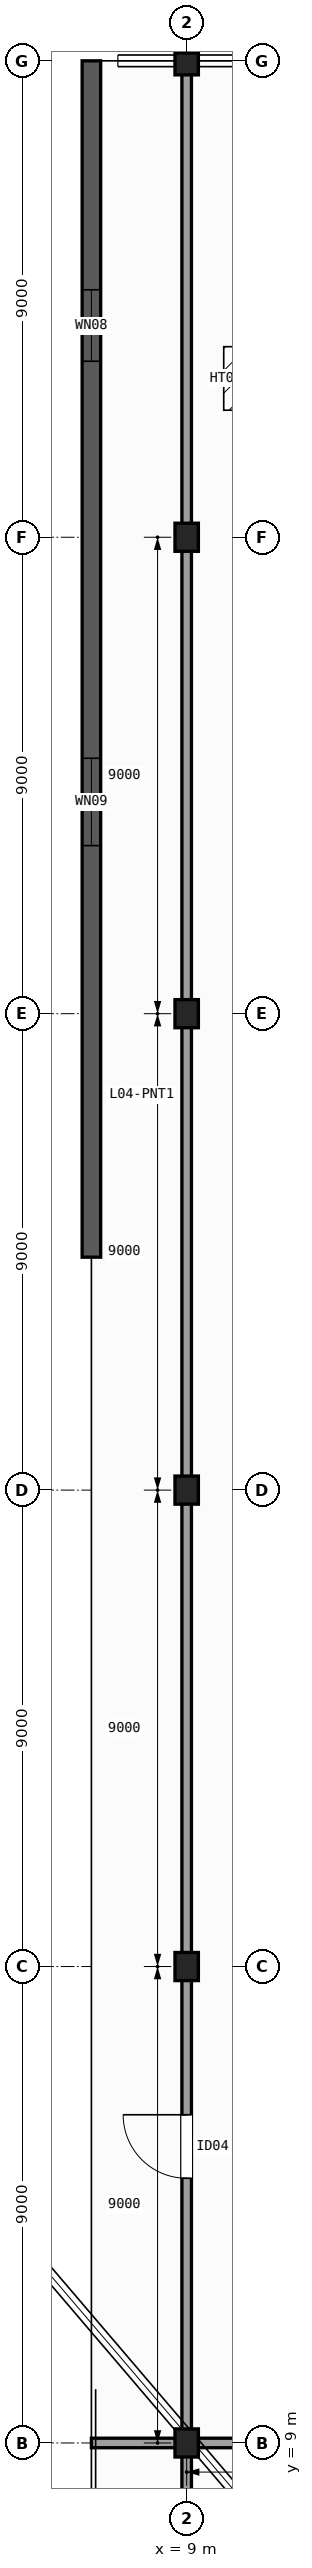
"""IFC4 building model, lengths in metres.
Left out: names, types, materials, properties, quantities, classifications, styles, units other than length and angle.
Written with IfcOpenShell. Run it as: python <this file> out.ifc"""

import sys

from ifc_helpers import new_model, si_unit, direction, frame, frame_2d, origin, origin_2d, place, context, subcontext, project, spatial, rectangle, i_section, extrude, element, fill, save


model = new_model("IFC4")
c1 = context("Model", 3, precision=1e-05, world=origin(), true_north=direction((0.0, 1.0)))
c2 = subcontext(c1, "Body", "Model", "MODEL_VIEW")
j1 = project(units=[si_unit("LENGTHUNIT", "METRE"), si_unit("PLANEANGLEUNIT", "RADIAN")], contexts=[c1])
p1 = place(None, origin())
s1 = spatial("IfcSite", under=j1, at=p1, CompositionType="ELEMENT")
p2 = place(p1, origin())
s2 = spatial("IfcBuilding", under=s1, at=p2, CompositionType="ELEMENT")
p3 = place(p2, frame((0.0, 0.0, 21.2)))
s3 = spatial("IfcBuildingStorey", under=s2, at=p3, CompositionType="ELEMENT", Elevation=21.2)
for number, where, z_axis, x_axis in (
    (1, (9.0, 9.0, 0.0), (0.0, 0.0, 1.0), (1.0, 0.0, 0.0)),
    (2, (9.0, 18.0, 0.0), (0.0, 0.0, 1.0), (1.0, 0.0, 0.0)),
    (3, (9.0, 27.0, 0.0), (0.0, 0.0, 1.0), (1.0, 0.0, 0.0)),
    (4, (9.0, 36.0, 0.0), (0.0, 0.0, 1.0), (1.0, 0.0, 0.0)),
    (5, (9.0, 45.0, 0.0), (0.0, 0.0, 1.0), (1.0, 0.0, 0.0)),
    (6, (9.0, 54.0, 0.0), (0.0, 0.0, 1.0), (1.0, 0.0, 0.0)),
):
    element("IfcColumn", number, at=place(p3, frame(where, z_axis=z_axis, x_axis=x_axis)), inside=s3, PredefinedType="COLUMN", context=c2, shape_type="SweptSolid", body=[
        extrude(i_section(OverallWidth=0.442, OverallDepth=0.531, WebThickness=0.066, FlangeThickness=0.106, FilletRadius=0.015, at=origin_2d()), origin(), (0.0, 0.0, 1.0), 4.8),
    ])
p4 = place(p3, frame((7.2, 31.4, 0.0), z_axis=(0.0, 0.0, 1.0), x_axis=(0.0, 1.0, 0.0)))
e7 = element("IfcWall", 7, at=p4, inside=s3, PredefinedType="SOLIDWALL", context=c2, shape_type="SweptSolid", body=[
    extrude(rectangle(XDim=22.6, YDim=0.35, at=frame_2d((11.3, 0.0))), origin(), (0.0, 0.0, 1.0), 4.48),
])
p5 = place(p4, frame((7.775, 0.0, 1.0)))
e8 = element("IfcOpeningElement", 8, at=p5, cuts=e7, PredefinedType="OPENING", context=c2, shape_type="SweptSolid", body=[
    extrude(rectangle(XDim=1.65, YDim=2.25, at=frame_2d((0.825, 1.125))), frame((0.0, 0.185, 0.0), z_axis=(0.0, -1.0, 0.0), x_axis=(1.0, 0.0, 0.0)), (0.0, 0.0, 1.0), 0.37),
])
p6 = place(p4, frame((16.925, 0.0, 1.0)))
e9 = element("IfcOpeningElement", 9, at=p6, cuts=e7, PredefinedType="OPENING", context=c2, shape_type="SweptSolid", body=[
    extrude(rectangle(XDim=1.35, YDim=2.1, at=frame_2d((0.675, 1.05))), frame((0.0, 0.185, 0.0), z_axis=(0.0, -1.0, 0.0), x_axis=(1.0, 0.0, 0.0)), (0.0, 0.0, 1.0), 0.37),
])
p7 = place(p3, frame((9.0, 7.2, 0.0), z_axis=(0.0, 0.0, 1.0), x_axis=(0.0, 1.0, 0.0)))
e10 = element("IfcWall", 10, at=p7, inside=s3, PredefinedType="PARTITIONING", context=c2, shape_type="SweptSolid", body=[
    extrude(rectangle(XDim=46.8, YDim=0.18, at=frame_2d((23.4, 0.0))), origin(), (0.0, 0.0, 1.0), 3.512),
])
p8 = place(p7, frame((6.8, 0.0, 0.0)))
e11 = element("IfcOpeningElement", 11, at=p8, cuts=e10, PredefinedType="OPENING", context=c2, shape_type="SweptSolid", body=[
    extrude(rectangle(XDim=1.2, YDim=2.15, at=frame_2d((0.6, 1.075))), frame((0.0, 0.1, 0.0), z_axis=(0.0, -1.0, 0.0), x_axis=(1.0, 0.0, 0.0)), (0.0, 0.0, 1.0), 0.2),
])
p9 = place(p3, frame((7.2, 9.0, 0.0), z_axis=(0.0, 0.0, 1.0), x_axis=(1.0, 0.0, 0.0)))
e12 = element("IfcWall", 12, at=p9, inside=s3, PredefinedType="PARTITIONING", context=c2, shape_type="SweptSolid", body=[
    extrude(rectangle(XDim=17.45, YDim=0.18, at=frame_2d((8.725, 0.0))), origin(), (0.0, 0.0, 1.0), 3.533),
])
p10 = place(p9, frame((6.3, 0.0, 0.0)))
e13 = element("IfcOpeningElement", 13, at=p10, cuts=e12, PredefinedType="OPENING", context=c2, shape_type="SweptSolid", body=[
    extrude(rectangle(XDim=0.86, YDim=2.05, at=frame_2d((0.43, 1.025))), frame((0.0, 0.1, 0.0), z_axis=(0.0, -1.0, 0.0), x_axis=(1.0, 0.0, 0.0)), (0.0, 0.0, 1.0), 0.2),
])
p11 = place(p5, origin())
e14 = element("IfcWindow", 14, at=p11, inside=s3, PartitioningType="SINGLE_PANEL", PredefinedType="WINDOW", context=c2, shape_type="SweptSolid", body=[
    extrude(rectangle(XDim=1.65, YDim=2.25, at=frame_2d((0.825, 1.125))), frame((0.0, 0.03, 0.0), z_axis=(0.0, -1.0, 0.0), x_axis=(1.0, 0.0, 0.0)), (0.0, 0.0, 1.0), 0.06),
])
fill(e8, e14)
p12 = place(p6, origin())
e15 = element("IfcWindow", 15, at=p12, inside=s3, PartitioningType="SINGLE_PANEL", PredefinedType="WINDOW", context=c2, shape_type="SweptSolid", body=[
    extrude(rectangle(XDim=1.35, YDim=2.1, at=frame_2d((0.675, 1.05))), frame((0.0, 0.03, 0.0), z_axis=(0.0, -1.0, 0.0), x_axis=(1.0, 0.0, 0.0)), (0.0, 0.0, 1.0), 0.06),
])
fill(e9, e15)
p13 = place(p3, frame((0.0, 0.0, -0.32)))
p14 = place(p13, frame((10.2, 48.0, 0.0)))
p15 = place(p14, frame((0.0, 0.0, 0.27)))
e16 = element("IfcDoor", 16, at=p15, inside=s3, OperationType="SINGLE_SWING_LEFT", PredefinedType="TRAPDOOR", context=c2, shape_type="SweptSolid", body=[
    extrude(rectangle(XDim=1.0, YDim=1.2, at=origin_2d()), origin(), (0.0, 0.0, 1.0), 0.05),
])
p16 = place(p8, origin())
e17 = element("IfcDoor", 17, at=p16, inside=s3, OperationType="SINGLE_SWING_RIGHT", PredefinedType="DOOR", context=c2, shape_type="SweptSolid", body=[
    extrude(rectangle(XDim=1.2, YDim=2.15, at=frame_2d((0.6, 1.075))), frame((0.0, 0.025, 0.0), z_axis=(0.0, -1.0, 0.0), x_axis=(1.0, 0.0, 0.0)), (0.0, 0.0, 1.0), 0.05),
])
fill(e11, e17)
save(model, sys.argv[1])
